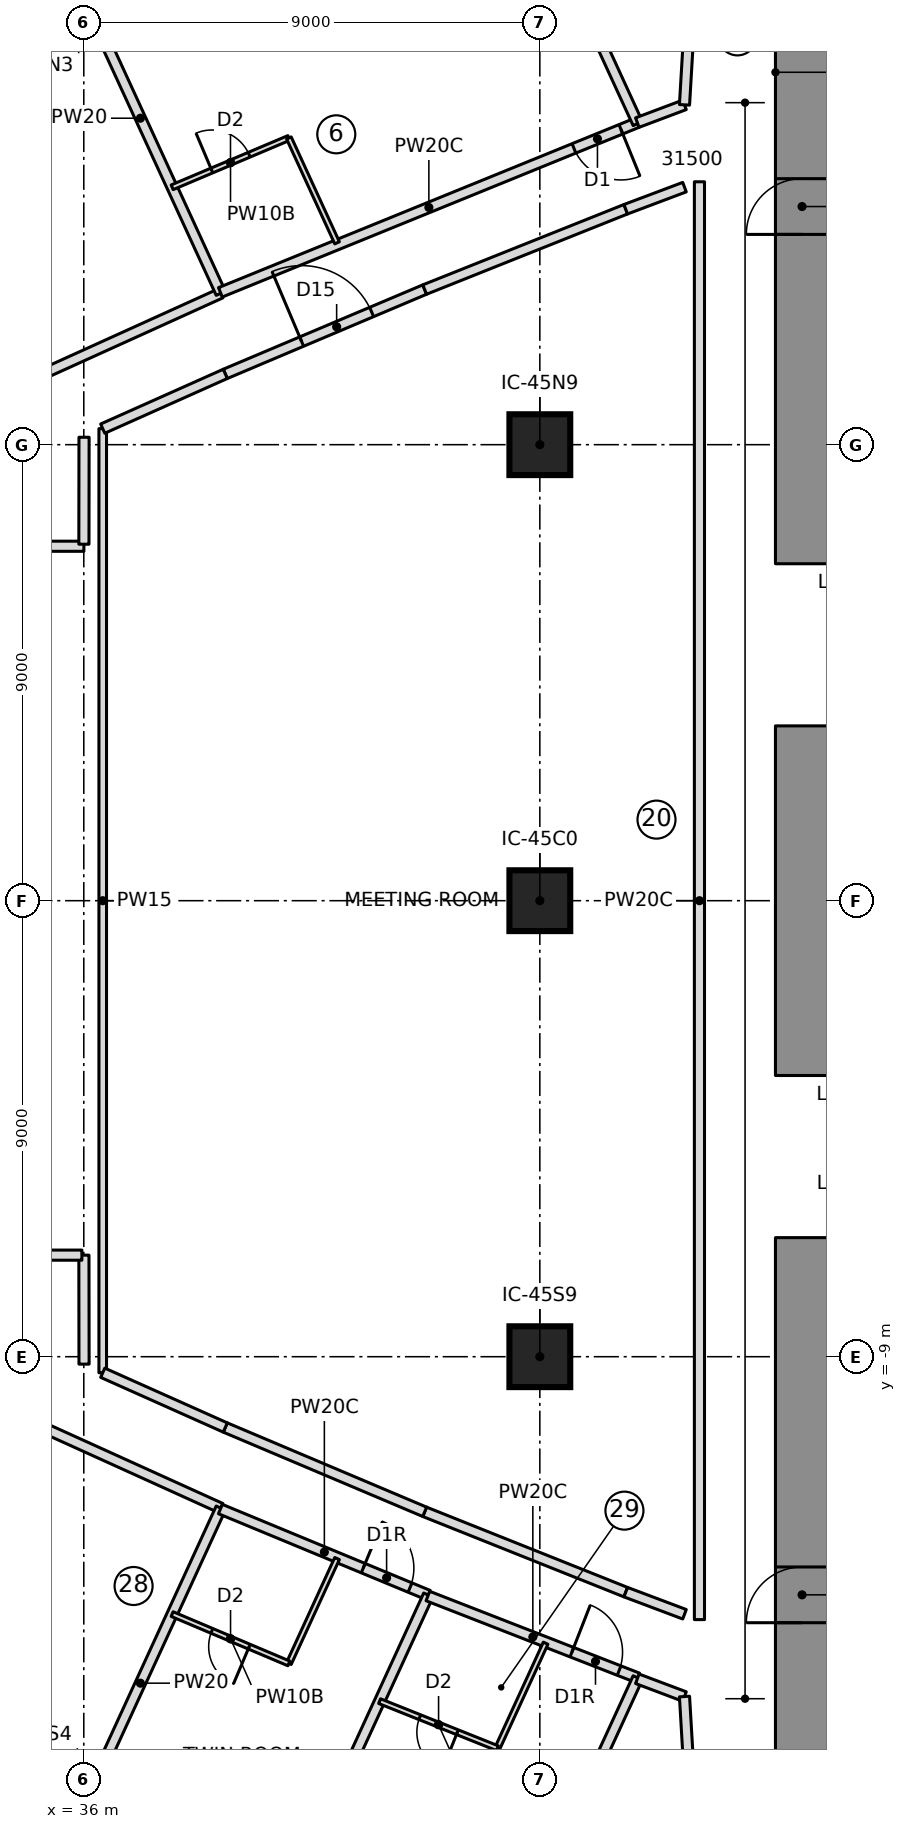
"""IFC4 building model, lengths in metres.
Left out: names, types, materials, properties, quantities, classifications, styles, units other than length and angle.
Written with IfcOpenShell. Run it as: python <this file> out.ifc"""

import sys

from ifc_helpers import new_model, si_unit, direction, frame, frame_2d, origin, origin_2d, place, context, subcontext, project, spatial, rectangle, extrude, element, fill, save


model = new_model("IFC4")
c1 = context("Model", 3, precision=1e-05, world=origin(), true_north=direction((0.0, 1.0)))
c2 = subcontext(c1, "Body", "Model", "MODEL_VIEW")
j1 = project(units=[si_unit("LENGTHUNIT", "METRE"), si_unit("PLANEANGLEUNIT", "RADIAN")], contexts=[c1])
p1 = place(None, origin())
s1 = spatial("IfcSite", under=j1, at=p1, CompositionType="ELEMENT")
p2 = place(p1, origin())
s2 = spatial("IfcBuilding", under=s1, at=p2, CompositionType="ELEMENT")
p3 = place(p2, frame((0.0, 0.0, 113.3)))
s3 = spatial("IfcBuildingStorey", under=s2, at=p3, CompositionType="ELEMENT", Elevation=113.3)
p4 = place(p3, frame((50.175, 6.65, 0.0), z_axis=(0.0, 0.0, 1.0), x_axis=(0.0, 1.0, 0.0)))
e1 = element("IfcWall", 1, at=p4, inside=s3, PredefinedType="SHEAR", context=c2, shape_type="SweptSolid", body=[
    extrude(rectangle(XDim=10.15, YDim=1.05, at=frame_2d((5.075, 0.0))), origin(), (0.0, 0.0, 1.0), 3.55),
])
p5 = place(p4, frame((6.5, 0.0, 0.0)))
e2 = element("IfcOpeningElement", 2, at=p5, cuts=e1, PredefinedType="OPENING", context=c2, shape_type="SweptSolid", body=[
    extrude(rectangle(XDim=1.1, YDim=2.1, at=frame_2d((0.55, 1.05))), frame((0.0, 0.535, 0.0), z_axis=(0.0, -1.0, 0.0), x_axis=(1.0, 0.0, 0.0)), (0.0, 0.0, 1.0), 1.07),
])
p6 = place(p3, frame((50.175, -3.45, 0.0), z_axis=(0.0, 0.0, 1.0), x_axis=(0.0, 1.0, 0.0)))
e3 = element("IfcWall", 3, at=p6, inside=s3, PredefinedType="SHEAR", context=c2, shape_type="SweptSolid", body=[
    extrude(rectangle(XDim=6.9, YDim=1.05, at=frame_2d((3.45, 0.0))), origin(), (0.0, 0.0, 1.0), 3.55),
])
p7 = place(p3, frame((50.175, -16.8, 0.0), z_axis=(0.0, 0.0, 1.0), x_axis=(0.0, 1.0, 0.0)))
e4 = element("IfcWall", 4, at=p7, inside=s3, PredefinedType="SHEAR", context=c2, shape_type="SweptSolid", body=[
    extrude(rectangle(XDim=10.15, YDim=1.05, at=frame_2d((5.075, 0.0))), origin(), (0.0, 0.0, 1.0), 3.55),
])
p8 = place(p7, frame((2.55, 0.0, 0.0)))
e5 = element("IfcOpeningElement", 5, at=p8, cuts=e4, PredefinedType="OPENING", context=c2, shape_type="SweptSolid", body=[
    extrude(rectangle(XDim=1.1, YDim=2.1, at=frame_2d((0.55, 1.05))), frame((0.0, 0.535, 0.0), z_axis=(0.0, -1.0, 0.0), x_axis=(1.0, 0.0, 0.0)), (0.0, 0.0, 1.0), 1.07),
])
for number, where, z_axis, x_axis in (
    (6, (45.0, -9.0, 0.0), (0.0, 0.0, 1.0), (1.0, 0.0, 0.0)),
    (7, (45.0, 0.0, 0.0), (0.0, 0.0, 1.0), (1.0, 0.0, 0.0)),
    (8, (45.0, 9.0, 0.0), (0.0, 0.0, 1.0), (1.0, 0.0, 0.0)),
):
    element("IfcColumn", number, at=place(p3, frame(where, z_axis=z_axis, x_axis=x_axis)), inside=s3, PredefinedType="COLUMN", context=c2, shape_type="SweptSolid", body=[
        extrude(rectangle(XDim=1.2, YDim=1.2, at=origin_2d()), origin(), (0.0, 0.0, 1.0), 3.55),
    ])
p9 = place(p3, frame((30.614, 8.32, 0.0), z_axis=(0.0, 0.0, 1.0), x_axis=(0.910751030363, 0.41295588226, 0.0)))
e9 = element("IfcWall", 9, at=p9, inside=s3, PredefinedType="PARTITIONING", context=c2, shape_type="SweptSolid", body=[
    extrude(rectangle(XDim=8.883, YDim=0.2, at=frame_2d((4.442, 0.0))), origin(), (0.0, 0.0, 1.0), 3.25),
])
p10 = place(p9, frame((0.45, 0.0, 0.0)))
e10 = element("IfcOpeningElement", 10, at=p10, cuts=e9, PredefinedType="OPENING", context=c2, shape_type="SweptSolid", body=[
    extrude(rectangle(XDim=1.0, YDim=2.1, at=frame_2d((0.5, 1.05))), frame((0.0, 0.11, 0.0), z_axis=(0.0, -1.0, 0.0), x_axis=(1.0, 0.0, 0.0)), (0.0, 0.0, 1.0), 0.22),
])
p11 = place(p3, frame((38.704, 11.989, 0.0), z_axis=(0.0, 0.0, 1.0), x_axis=(-0.417416334044, 0.908715359215, 0.0)))
e11 = element("IfcWall", 11, at=p11, inside=s3, PredefinedType="PARTITIONING", context=c2, shape_type="SweptSolid", body=[
    extrude(rectangle(XDim=7.604, YDim=0.2, at=frame_2d((3.802, 0.0))), origin(), (0.0, 0.0, 1.0), 3.25),
])
p12 = place(p3, frame((46.924, 15.357, 0.0), z_axis=(0.0, 0.0, 1.0), x_axis=(-0.926186929429, -0.377064678477, 0.0)))
e12 = element("IfcWall", 12, at=p12, inside=s3, PredefinedType="PARTITIONING", context=c2, shape_type="SweptSolid", body=[
    extrude(rectangle(XDim=8.884, YDim=0.2, at=frame_2d((4.442, 0.0))), origin(), (0.0, 0.0, 1.0), 3.25),
])
p13 = place(p12, frame((0.35, 0.0, 0.0)))
e13 = element("IfcOpeningElement", 13, at=p13, cuts=e12, PredefinedType="OPENING", context=c2, shape_type="SweptSolid", body=[
    extrude(rectangle(XDim=1.0, YDim=2.1, at=frame_2d((0.5, 1.05))), frame((0.0, 0.11, 0.0), z_axis=(0.0, -1.0, 0.0), x_axis=(1.0, 0.0, 0.0)), (0.0, 0.0, 1.0), 0.22),
])
p14 = place(p3, frame((37.744, 14.08, 0.0), z_axis=(0.0, 0.0, 1.0), x_axis=(0.921042675983, 0.38946166566, 0.0)))
e14 = element("IfcWall", 14, at=p14, inside=s3, PredefinedType="PARTITIONING", context=c2, shape_type="SweptSolid", body=[
    extrude(rectangle(XDim=2.501, YDim=0.1, at=frame_2d((1.25, 0.0))), origin(), (0.0, 0.0, 1.0), 3.25),
])
p15 = place(p14, frame((0.85, 0.0, 0.0)))
e15 = element("IfcOpeningElement", 15, at=p15, cuts=e14, PredefinedType="OPENING", context=c2, shape_type="SweptSolid", body=[
    extrude(rectangle(XDim=0.8, YDim=2.1, at=frame_2d((0.4, 1.05))), frame((0.0, 0.06, 0.0), z_axis=(0.0, -1.0, 0.0), x_axis=(1.0, 0.0, 0.0)), (0.0, 0.0, 1.0), 0.12),
])
p16 = place(p3, frame((40.048, 15.054, 0.0), z_axis=(0.0, 0.0, 1.0), x_axis=(0.417433204355, -0.908707609686, 0.0)))
e16 = element("IfcWall", 16, at=p16, inside=s3, PredefinedType="PARTITIONING", context=c2, shape_type="SweptSolid", body=[
    extrude(rectangle(XDim=2.278, YDim=0.1, at=frame_2d((1.139, 0.0))), origin(), (0.0, 0.0, 1.0), 3.25),
])
p17 = place(p3, frame((46.933, 15.339, 0.0), z_axis=(0.0, 0.0, 1.0), x_axis=(-0.417437957167, 0.908705426371, 0.0)))
e17 = element("IfcWall", 17, at=p17, inside=s3, PredefinedType="PARTITIONING", context=c2, shape_type="SweptSolid", body=[
    extrude(rectangle(XDim=7.619, YDim=0.2, at=frame_2d((3.81, 0.0))), origin(), (0.0, 0.0, 1.0), 3.25),
])
p18 = place(p3, frame((30.614, -8.32, 0.0), z_axis=(0.0, 0.0, 1.0), x_axis=(0.910751030363, -0.41295588226, 0.0)))
e18 = element("IfcWall", 18, at=p18, inside=s3, PredefinedType="PARTITIONING", context=c2, shape_type="SweptSolid", body=[
    extrude(rectangle(XDim=8.883, YDim=0.2, at=frame_2d((4.442, 0.0))), origin(), (0.0, 0.0, 1.0), 3.25),
])
p19 = place(p18, frame((0.45, 0.0, 0.0)))
e19 = element("IfcOpeningElement", 19, at=p19, cuts=e18, PredefinedType="OPENING", context=c2, shape_type="SweptSolid", body=[
    extrude(rectangle(XDim=1.0, YDim=2.1, at=frame_2d((0.5, 1.05))), frame((0.0, 0.11, 0.0), z_axis=(0.0, -1.0, 0.0), x_axis=(1.0, 0.0, 0.0)), (0.0, 0.0, 1.0), 0.22),
])
p20 = place(p3, frame((35.531, -18.898, 0.0), z_axis=(0.0, 0.0, 1.0), x_axis=(0.417416334044, 0.908715359215, 0.0)))
e20 = element("IfcWall", 20, at=p20, inside=s3, PredefinedType="PARTITIONING", context=c2, shape_type="SweptSolid", body=[
    extrude(rectangle(XDim=7.604, YDim=0.2, at=frame_2d((3.802, 0.0))), origin(), (0.0, 0.0, 1.0), 3.25),
])
p21 = place(p3, frame((38.696, -12.007, 0.0), z_axis=(0.0, 0.0, 1.0), x_axis=(0.923970612896, -0.382463470811, 0.0)))
e21 = element("IfcWall", 21, at=p21, inside=s3, PredefinedType="PARTITIONING", context=c2, shape_type="SweptSolid", body=[
    extrude(rectangle(XDim=4.441, YDim=0.2, at=frame_2d((2.22, 0.0))), origin(), (0.0, 0.0, 1.0), 3.25),
])
p22 = place(p21, frame((3.05, 0.0, 0.0)))
e22 = element("IfcOpeningElement", 22, at=p22, cuts=e21, PredefinedType="OPENING", context=c2, shape_type="SweptSolid", body=[
    extrude(rectangle(XDim=1.0, YDim=2.1, at=frame_2d((0.5, 1.05))), frame((0.0, 0.11, 0.0), z_axis=(0.0, -1.0, 0.0), x_axis=(1.0, 0.0, 0.0)), (0.0, 0.0, 1.0), 0.22),
])
p23 = place(p3, frame((40.999, -12.984, 0.0), z_axis=(0.0, 0.0, 1.0), x_axis=(-0.417433204355, -0.908707609686, 0.0)))
e23 = element("IfcWall", 23, at=p23, inside=s3, PredefinedType="PARTITIONING", context=c2, shape_type="SweptSolid", body=[
    extrude(rectangle(XDim=2.278, YDim=0.1, at=frame_2d((1.139, 0.0))), origin(), (0.0, 0.0, 1.0), 3.25),
])
p24 = place(p3, frame((40.048, -15.054, 0.0), z_axis=(0.0, 0.0, 1.0), x_axis=(-0.921042675983, 0.38946166566, 0.0)))
e24 = element("IfcWall", 24, at=p24, inside=s3, PredefinedType="PARTITIONING", context=c2, shape_type="SweptSolid", body=[
    extrude(rectangle(XDim=2.501, YDim=0.1, at=frame_2d((1.25, 0.0))), origin(), (0.0, 0.0, 1.0), 3.25),
])
p25 = place(p24, frame((0.85, 0.0, 0.0)))
e25 = element("IfcOpeningElement", 25, at=p25, cuts=e24, PredefinedType="OPENING", context=c2, shape_type="SweptSolid", body=[
    extrude(rectangle(XDim=0.8, YDim=2.1, at=frame_2d((0.4, 1.05))), frame((0.0, 0.06, 0.0), z_axis=(0.0, -1.0, 0.0), x_axis=(1.0, 0.0, 0.0)), (0.0, 0.0, 1.0), 0.12),
])
p26 = place(p3, frame((39.623, -20.62, 0.0), z_axis=(0.0, 0.0, 1.0), x_axis=(0.417427858403, 0.908710065438, 0.0)))
e26 = element("IfcWall", 26, at=p26, inside=s3, PredefinedType="PARTITIONING", context=c2, shape_type="SweptSolid", body=[
    extrude(rectangle(XDim=7.61, YDim=0.2, at=frame_2d((3.805, 0.0))), origin(), (0.0, 0.0, 1.0), 3.25),
])
p27 = place(p3, frame((42.791, -13.724, 0.0), z_axis=(0.0, 0.0, 1.0), x_axis=(0.931672401616, -0.363299512891, 0.0)))
e27 = element("IfcWall", 27, at=p27, inside=s3, PredefinedType="PARTITIONING", context=c2, shape_type="SweptSolid", body=[
    extrude(rectangle(XDim=4.445, YDim=0.2, at=frame_2d((2.223, 0.0))), origin(), (0.0, 0.0, 1.0), 3.25),
])
p28 = place(p27, frame((3.05, 0.0, 0.0)))
e28 = element("IfcOpeningElement", 28, at=p28, cuts=e27, PredefinedType="OPENING", context=c2, shape_type="SweptSolid", body=[
    extrude(rectangle(XDim=1.0, YDim=2.1, at=frame_2d((0.5, 1.05))), frame((0.0, 0.11, 0.0), z_axis=(0.0, -1.0, 0.0), x_axis=(1.0, 0.0, 0.0)), (0.0, 0.0, 1.0), 0.22),
])
p29 = place(p3, frame((45.114, -14.655, 0.0), z_axis=(0.0, 0.0, 1.0), x_axis=(-0.417373525971, -0.908735021785, 0.0)))
e29 = element("IfcWall", 29, at=p29, inside=s3, PredefinedType="PARTITIONING", context=c2, shape_type="SweptSolid", body=[
    extrude(rectangle(XDim=2.28, YDim=0.1, at=frame_2d((1.14, 0.0))), origin(), (0.0, 0.0, 1.0), 3.25),
])
p30 = place(p3, frame((44.163, -16.727, 0.0), z_axis=(0.0, 0.0, 1.0), x_axis=(-0.928638024739, 0.370987087388, 0.0)))
e30 = element("IfcWall", 30, at=p30, inside=s3, PredefinedType="PARTITIONING", context=c2, shape_type="SweptSolid", body=[
    extrude(rectangle(XDim=2.503, YDim=0.1, at=frame_2d((1.252, 0.0))), origin(), (0.0, 0.0, 1.0), 3.25),
])
p31 = place(p30, frame((0.85, 0.0, 0.0)))
e31 = element("IfcOpeningElement", 31, at=p31, cuts=e30, PredefinedType="OPENING", context=c2, shape_type="SweptSolid", body=[
    extrude(rectangle(XDim=0.8, YDim=2.1, at=frame_2d((0.4, 1.05))), frame((0.0, 0.06, 0.0), z_axis=(0.0, -1.0, 0.0), x_axis=(1.0, 0.0, 0.0)), (0.0, 0.0, 1.0), 0.12),
])
p32 = place(p3, frame((43.752, -22.262, 0.0), z_axis=(0.0, 0.0, 1.0), x_axis=(0.417437957167, 0.908705426371, 0.0)))
e32 = element("IfcWall", 32, at=p32, inside=s3, PredefinedType="PARTITIONING", context=c2, shape_type="SweptSolid", body=[
    extrude(rectangle(XDim=7.619, YDim=0.2, at=frame_2d((3.81, 0.0))), origin(), (0.0, 0.0, 1.0), 3.25),
])
p33 = place(p3, frame((36.374, -9.317, 0.0), z_axis=(0.0, 0.0, 1.0), x_axis=(0.0, 1.0, 0.0)))
e33 = element("IfcWall", 33, at=p33, inside=s3, PredefinedType="PARTITIONING", context=c2, shape_type="SweptSolid", body=[
    extrude(rectangle(XDim=18.634, YDim=0.15, at=frame_2d((9.317, 0.0))), origin(), (0.0, 0.0, 1.0), 3.25),
])
p34 = place(p3, frame((38.792, 10.397, 0.0), z_axis=(0.0, 0.0, 1.0), x_axis=(0.921037415532, 0.389474105929, 0.0)))
e34 = element("IfcWall", 34, at=p34, inside=s3, PredefinedType="PARTITIONING", context=c2, shape_type="SweptSolid", body=[
    extrude(rectangle(XDim=4.273, YDim=0.2, at=frame_2d((2.137, 0.0))), origin(), (0.0, 0.0, 1.0), 3.25),
])
p35 = place(p34, frame((1.636, 0.0, 0.0)))
e35 = element("IfcOpeningElement", 35, at=p35, cuts=e34, PredefinedType="OPENING", context=c2, shape_type="SweptSolid", body=[
    extrude(rectangle(XDim=1.5, YDim=2.1, at=frame_2d((0.75, 1.05))), frame((0.0, 0.11, 0.0), z_axis=(0.0, -1.0, 0.0), x_axis=(1.0, 0.0, 0.0)), (0.0, 0.0, 1.0), 0.22),
])
for number, where, z_axis, x_axis in (
    (36, (42.728, 12.062, 0.0), (0.0, 0.0, 1.0), (0.929, 0.371, 0.0)),
    (37, (46.696, -13.647, 0.0), (0.0, 0.0, 1.0), (-0.929, 0.371, 0.0)),
):
    element("IfcWall", number, at=place(p3, frame(where, z_axis=z_axis, x_axis=x_axis)), inside=s3, PredefinedType="PARTITIONING", context=c2, shape_type="SweptSolid", body=[
        extrude(rectangle(XDim=4.273, YDim=0.2, at=frame_2d((2.136, 0.0))), origin(), (0.0, 0.0, 1.0), 3.25),
    ])
p36 = place(p3, frame((42.728, -12.062, 0.0), z_axis=(0.0, 0.0, 1.0), x_axis=(-0.921037415532, 0.389474105929, 0.0)))
e38 = element("IfcWall", 38, at=p36, inside=s3, PredefinedType="PARTITIONING", context=c2, shape_type="SweptSolid", body=[
    extrude(rectangle(XDim=4.273, YDim=0.2, at=frame_2d((2.137, 0.0))), origin(), (0.0, 0.0, 1.0), 3.25),
])
for number, where, z_axis, x_axis in (
    (39, (38.792, -10.397, 0.0), (0.0, 0.0, 1.0), (-0.913, 0.408, 0.0)),
    (40, (36.374, 9.317, 0.0), (0.0, 0.0, 1.0), (0.913, 0.408, 0.0)),
):
    element("IfcWall", number, at=place(p3, frame(where, z_axis=z_axis, x_axis=x_axis)), inside=s3, PredefinedType="PARTITIONING", context=c2, shape_type="SweptSolid", body=[
        extrude(rectangle(XDim=2.648, YDim=0.2, at=frame_2d((1.324, 0.0))), origin(), (0.0, 0.0, 1.0), 3.25),
    ])
for number, where, z_axis, x_axis in (
    (41, (47.855, 15.707, 0.0), (0.0, 0.0, 1.0), (-0.936, -0.353, 0.0)),
    (42, (46.924, -15.357, 0.0), (0.0, 0.0, 1.0), (0.936, -0.353, 0.0)),
):
    element("IfcWall", number, at=place(p3, frame(where, z_axis=z_axis, x_axis=x_axis)), inside=s3, PredefinedType="PARTITIONING", context=c2, shape_type="SweptSolid", body=[
        extrude(rectangle(XDim=0.995, YDim=0.2, at=frame_2d((0.497, 0.0))), origin(), (0.0, 0.0, 1.0), 3.25),
    ])
for number, where, z_axis, x_axis in (
    (43, (46.696, 13.647, 0.0), (0.0, 0.0, 1.0), (0.936, 0.352, 0.0)),
    (44, (47.855, -14.083, 0.0), (0.0, 0.0, 1.0), (-0.936, 0.352, 0.0)),
):
    element("IfcWall", number, at=place(p3, frame(where, z_axis=z_axis, x_axis=x_axis)), inside=s3, PredefinedType="PARTITIONING", context=c2, shape_type="SweptSolid", body=[
        extrude(rectangle(XDim=1.239, YDim=0.2, at=frame_2d((0.619, 0.0))), origin(), (0.0, 0.0, 1.0), 3.25),
    ])
p37 = place(p3, frame((48.146, 20.652, 0.0), z_axis=(0.0, 0.0, 1.0), x_axis=(-0.058649792989, -0.998278619315, 0.0)))
e45 = element("IfcWall", 45, at=p37, inside=s3, PredefinedType="PARTITIONING", context=c2, shape_type="SweptSolid", body=[
    extrude(rectangle(XDim=4.954, YDim=0.2, at=frame_2d((2.477, 0.0))), origin(), (0.0, 0.0, 1.0), 3.25),
])
p38 = place(p37, frame((1.977, 0.0, 0.0)))
e46 = element("IfcOpeningElement", 46, at=p38, cuts=e45, PredefinedType="OPENING", context=c2, shape_type="SweptSolid", body=[
    extrude(rectangle(XDim=1.0, YDim=2.1, at=frame_2d((0.5, 1.05))), frame((0.0, 0.11, 0.0), z_axis=(0.0, -1.0, 0.0), x_axis=(1.0, 0.0, 0.0)), (0.0, 0.0, 1.0), 0.22),
])
p39 = place(p3, frame((47.855, -15.707, 0.0), z_axis=(0.0, 0.0, 1.0), x_axis=(0.058568850083, -0.998283371493, 0.0)))
e47 = element("IfcWall", 47, at=p39, inside=s3, PredefinedType="PARTITIONING", context=c2, shape_type="SweptSolid", body=[
    extrude(rectangle(XDim=4.952, YDim=0.2, at=frame_2d((2.476, 0.0))), origin(), (0.0, 0.0, 1.0), 3.25),
])
p40 = place(p39, frame((1.976, 0.0, 0.0)))
e48 = element("IfcOpeningElement", 48, at=p40, cuts=e47, PredefinedType="OPENING", context=c2, shape_type="SweptSolid", body=[
    extrude(rectangle(XDim=1.0, YDim=2.1, at=frame_2d((0.5, 1.05))), frame((0.0, 0.11, 0.0), z_axis=(0.0, -1.0, 0.0), x_axis=(1.0, 0.0, 0.0)), (0.0, 0.0, 1.0), 0.22),
])
p41 = place(p3, frame((36.005, -9.146, 0.0), z_axis=(0.0, 0.0, 1.0), x_axis=(-0.001135073049, 0.999999355804, 0.0)))
e49 = element("IfcWall", 49, at=p41, inside=s3, PredefinedType="PARTITIONING", context=c2, shape_type="SweptSolid", body=[
    extrude(rectangle(XDim=2.151, YDim=0.2, at=frame_2d((1.075, 0.0))), origin(), (0.0, 0.0, 1.0), 3.25),
])
p42 = place(p3, frame((35.962, -6.996, 0.0), z_axis=(0.0, 0.0, 1.0), x_axis=(-0.999999992409, 0.000123213405, 0.0)))
e50 = element("IfcWall", 50, at=p42, inside=s3, PredefinedType="PARTITIONING", context=c2, shape_type="SweptSolid", body=[
    extrude(rectangle(XDim=3.963, YDim=0.2, at=frame_2d((1.981, 0.0))), origin(), (0.0, 0.0, 1.0), 3.25),
])
p43 = place(p3, frame((32.0, 6.995, 0.0), z_axis=(0.0, 0.0, 1.0), x_axis=(0.99999999256, 0.00012198097, 0.0)))
e51 = element("IfcWall", 51, at=p43, inside=s3, PredefinedType="PARTITIONING", context=c2, shape_type="SweptSolid", body=[
    extrude(rectangle(XDim=4.003, YDim=0.2, at=frame_2d((2.001, 0.0))), origin(), (0.0, 0.0, 1.0), 3.25),
])
p44 = place(p3, frame((36.002, 7.036, 0.0), z_axis=(0.0, 0.0, 1.0), x_axis=(0.001156603436, 0.999999331134, 0.0)))
e52 = element("IfcWall", 52, at=p44, inside=s3, PredefinedType="PARTITIONING", context=c2, shape_type="SweptSolid", body=[
    extrude(rectangle(XDim=2.111, YDim=0.2, at=frame_2d((1.055, 0.0))), origin(), (0.0, 0.0, 1.0), 3.25),
])
p45 = place(p3, frame((48.15, 14.189, 0.0), z_axis=(0.0, 0.0, 1.0), x_axis=(0.0, -1.0, 0.0)))
e53 = element("IfcWall", 53, at=p45, inside=s3, PredefinedType="PARTITIONING", context=c2, shape_type="SweptSolid", body=[
    extrude(rectangle(XDim=28.377, YDim=0.2, at=frame_2d((14.189, 0.0))), origin(), (0.0, 0.0, 1.0), 3.25),
])
p46 = place(p15, origin())
e54 = element("IfcDoor", 54, at=p46, inside=s3, OperationType="SINGLE_SWING_LEFT", PredefinedType="DOOR", context=c2, shape_type="SweptSolid", body=[
    extrude(rectangle(XDim=0.8, YDim=2.1, at=frame_2d((0.4, 1.05))), frame((0.0, 0.025, 0.0), z_axis=(0.0, -1.0, 0.0), x_axis=(1.0, 0.0, 0.0)), (0.0, 0.0, 1.0), 0.05),
])
fill(e15, e54)
p47 = place(p13, origin())
e55 = element("IfcDoor", 55, at=p47, inside=s3, OperationType="SINGLE_SWING_LEFT", PredefinedType="DOOR", context=c2, shape_type="SweptSolid", body=[
    extrude(rectangle(XDim=1.0, YDim=2.1, at=frame_2d((0.5, 1.05))), frame((0.0, 0.025, 0.0), z_axis=(0.0, -1.0, 0.0), x_axis=(1.0, 0.0, 0.0)), (0.0, 0.0, 1.0), 0.05),
])
fill(e13, e55)
p48 = place(p25, origin())
e56 = element("IfcDoor", 56, at=p48, inside=s3, OperationType="SINGLE_SWING_LEFT", PredefinedType="DOOR", context=c2, shape_type="SweptSolid", body=[
    extrude(rectangle(XDim=0.8, YDim=2.1, at=frame_2d((0.4, 1.05))), frame((0.0, 0.025, 0.0), z_axis=(0.0, -1.0, 0.0), x_axis=(1.0, 0.0, 0.0)), (0.0, 0.0, 1.0), 0.05),
])
fill(e25, e56)
p49 = place(p22, origin())
e57 = element("IfcDoor", 57, at=p49, inside=s3, OperationType="SINGLE_SWING_RIGHT", PredefinedType="DOOR", context=c2, shape_type="SweptSolid", body=[
    extrude(rectangle(XDim=1.0, YDim=2.1, at=frame_2d((0.5, 1.05))), frame((0.0, 0.025, 0.0), z_axis=(0.0, -1.0, 0.0), x_axis=(1.0, 0.0, 0.0)), (0.0, 0.0, 1.0), 0.05),
])
fill(e22, e57)
p50 = place(p31, origin())
e58 = element("IfcDoor", 58, at=p50, inside=s3, OperationType="SINGLE_SWING_LEFT", PredefinedType="DOOR", context=c2, shape_type="SweptSolid", body=[
    extrude(rectangle(XDim=0.8, YDim=2.1, at=frame_2d((0.4, 1.05))), frame((0.0, 0.025, 0.0), z_axis=(0.0, -1.0, 0.0), x_axis=(1.0, 0.0, 0.0)), (0.0, 0.0, 1.0), 0.05),
])
fill(e31, e58)
p51 = place(p28, origin())
e59 = element("IfcDoor", 59, at=p51, inside=s3, OperationType="SINGLE_SWING_RIGHT", PredefinedType="DOOR", context=c2, shape_type="SweptSolid", body=[
    extrude(rectangle(XDim=1.0, YDim=2.1, at=frame_2d((0.5, 1.05))), frame((0.0, 0.025, 0.0), z_axis=(0.0, -1.0, 0.0), x_axis=(1.0, 0.0, 0.0)), (0.0, 0.0, 1.0), 0.05),
])
fill(e28, e59)
p52 = place(p35, origin())
e60 = element("IfcDoor", 60, at=p52, inside=s3, OperationType="DOUBLE_DOOR_SINGLE_SWING", PredefinedType="DOOR", context=c2, shape_type="SweptSolid", body=[
    extrude(rectangle(XDim=1.5, YDim=2.1, at=frame_2d((0.75, 1.05))), frame((0.0, 0.025, 0.0), z_axis=(0.0, -1.0, 0.0), x_axis=(1.0, 0.0, 0.0)), (0.0, 0.0, 1.0), 0.05),
])
fill(e35, e60)
p53 = place(p5, origin())
e61 = element("IfcDoor", 61, at=p53, inside=s3, OperationType="SINGLE_SWING_RIGHT", PredefinedType="DOOR", context=c2, shape_type="SweptSolid", body=[
    extrude(rectangle(XDim=1.1, YDim=2.1, at=frame_2d((0.55, 1.05))), frame((0.0, 0.025, 0.0), z_axis=(0.0, -1.0, 0.0), x_axis=(1.0, 0.0, 0.0)), (0.0, 0.0, 1.0), 0.05),
])
fill(e2, e61)
p54 = place(p8, origin())
e62 = element("IfcDoor", 62, at=p54, inside=s3, OperationType="SINGLE_SWING_RIGHT", PredefinedType="DOOR", context=c2, shape_type="SweptSolid", body=[
    extrude(rectangle(XDim=1.1, YDim=2.1, at=frame_2d((0.55, 1.05))), frame((0.0, 0.025, 0.0), z_axis=(0.0, -1.0, 0.0), x_axis=(1.0, 0.0, 0.0)), (0.0, 0.0, 1.0), 0.05),
])
fill(e5, e62)
save(model, sys.argv[1])
